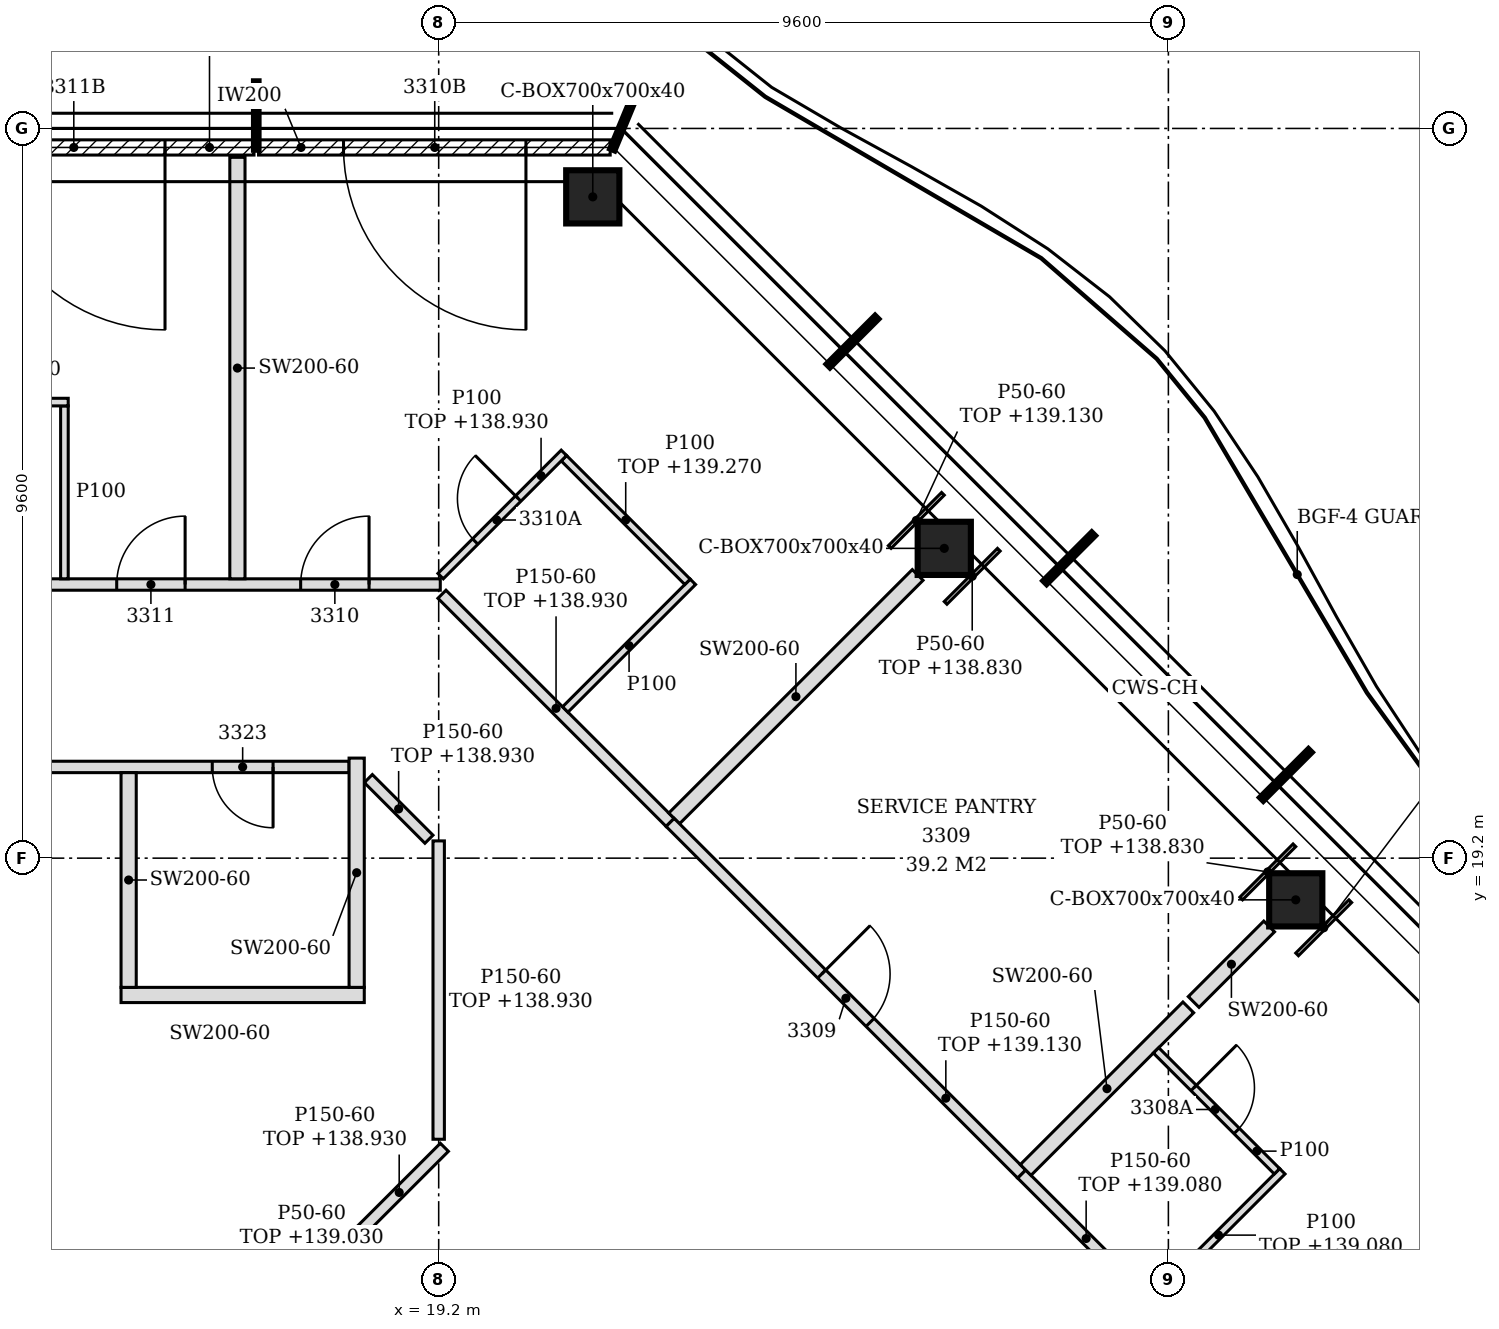
"""IFC4 building model, lengths in metres.
Left out: names, types, materials, properties, quantities, classifications, styles, units other than length and angle.
Written with IfcOpenShell. Run it as: python <this file> out.ifc"""

import sys

from ifc_helpers import new_model, si_unit, direction, frame, frame_2d, origin, origin_2d, place, context, subcontext, project, spatial, polyline, rectangle, hollow_rectangle, outline, extrude, element, fill, save


model = new_model("IFC4")
c1 = context("Model", 3, precision=1e-05, world=origin(), true_north=direction((0.0, 1.0)))
c2 = subcontext(c1, "Body", "Model", "MODEL_VIEW")
j1 = project(units=[si_unit("LENGTHUNIT", "METRE"), si_unit("PLANEANGLEUNIT", "RADIAN")], contexts=[c1])
p1 = place(None, origin())
s1 = spatial("IfcSite", under=j1, at=p1, CompositionType="ELEMENT")
p2 = place(p1, origin())
s2 = spatial("IfcBuilding", under=s1, at=p2, CompositionType="ELEMENT")
p3 = place(p2, frame((0.0, 0.0, 136.2)))
s3 = spatial("IfcBuildingStorey", under=s2, at=p3, CompositionType="ELEMENT", Elevation=136.2)
for number, where, z_axis, x_axis in (
    (1, (30.476, 18.652, -0.15), (0.0, 0.0, 1.0), (1.0, 0.0, 0.0)),
    (2, (25.852, 23.276, -0.15), (0.0, 0.0, 1.0), (1.0, 0.0, 0.0)),
    (3, (21.227, 27.9, -0.15), (0.0, 0.0, 1.0), (1.0, 0.0, 0.0)),
):
    element("IfcColumn", number, at=place(p3, frame(where, z_axis=z_axis, x_axis=x_axis)), inside=s3, PredefinedType="COLUMN", context=c2, shape_type="SweptSolid", body=[
        extrude(hollow_rectangle(XDim=0.7, YDim=0.7, WallThickness=0.04, at=origin_2d()), origin(), (0.0, 0.0, 1.0), 3.6),
    ])
p4 = place(p3, frame((21.457, 28.55, 0.0), z_axis=(0.0, 0.0, 1.0), x_axis=(-1.0, 0.0, 0.0)))
e4 = element("IfcWall", 4, at=p4, inside=s3, PredefinedType="NOTDEFINED", context=c2, shape_type="SweptSolid", body=[
    extrude(rectangle(XDim=4.626, YDim=0.2, at=frame_2d((2.313, 0.0))), origin(), (0.0, 0.0, 1.0), 3.45),
])
p5 = place(p4, frame((1.108, 0.0, 0.0)))
e5 = element("IfcOpeningElement", 5, at=p5, cuts=e4, PredefinedType="OPENING", context=c2, shape_type="SweptSolid", body=[
    extrude(rectangle(XDim=2.4, YDim=2.4, at=frame_2d((1.2, 1.2))), frame((0.0, 0.11, 0.0), z_axis=(0.0, -1.0, 0.0), x_axis=(1.0, 0.0, 0.0)), (0.0, 0.0, 1.0), 0.22),
])
p6 = place(p3, frame((16.77, 28.55, 0.0), z_axis=(0.0, 0.0, 1.0), x_axis=(-1.0, 0.0, 0.0)))
e6 = element("IfcWall", 6, at=p6, inside=s3, PredefinedType="NOTDEFINED", context=c2, shape_type="SweptSolid", body=[
    extrude(rectangle(XDim=4.74, YDim=0.2, at=frame_2d((2.37, 0.0))), origin(), (0.0, 0.0, 1.0), 3.45),
])
p7 = place(p6, frame((1.17, 0.0, 0.0)))
e7 = element("IfcOpeningElement", 7, at=p7, cuts=e6, PredefinedType="OPENING", context=c2, shape_type="SweptSolid", body=[
    extrude(rectangle(XDim=2.4, YDim=2.4, at=frame_2d((1.2, 1.2))), frame((0.0, 0.11, 0.0), z_axis=(0.0, -1.0, 0.0), x_axis=(1.0, 0.0, 0.0)), (0.0, 0.0, 1.0), 0.22),
])
p8 = place(p3, frame((28.567, 13.348, 0.0), z_axis=(0.0, 0.0, 1.0), x_axis=(-0.707310148094, 0.706903355773, 0.0)))
e8 = element("IfcWall", 8, at=p8, inside=s3, PredefinedType="PARTITIONING", context=c2, shape_type="SweptSolid", body=[
    extrude(rectangle(XDim=2.401, YDim=0.15, at=frame_2d((1.2, 0.0))), origin(), (0.0, 0.0, 1.0), 2.88),
])
p9 = place(p3, frame((18.991, 13.408, 0.0), z_axis=(0.0, 0.0, 1.0), x_axis=(-0.706998801226, 0.70721474466, 0.0)))
e9 = element("IfcWall", 9, at=p9, inside=s3, PredefinedType="PARTITIONING", context=c2, shape_type="SweptSolid", body=[
    extrude(rectangle(XDim=1.131, YDim=0.15, at=frame_2d((0.565, 0.0))), origin(), (0.0, 0.0, 1.0), 3.45),
])
p10 = place(p3, frame((28.62, 13.401, 0.0), z_axis=(0.0, 0.0, 1.0), x_axis=(0.707055379538, 0.707158179099, 0.0)))
e10 = element("IfcWall", 10, at=p10, inside=s3, PredefinedType="PARTITIONING", context=c2, shape_type="SweptSolid", body=[
    extrude(rectangle(XDim=2.375, YDim=0.1, at=frame_2d((1.188, 0.0))), origin(), (0.0, 0.0, 1.0), 2.88),
])
p11 = place(p3, frame((18.086, 14.208, 0.0), z_axis=(0.0, 0.0, 1.0), x_axis=(0.70739723372, 0.706816209298, 0.0)))
e11 = element("IfcWall", 11, at=p11, inside=s3, PredefinedType="PARTITIONING", context=c2, shape_type="SweptSolid", body=[
    extrude(rectangle(XDim=1.681, YDim=0.15, at=frame_2d((0.84, 0.0))), origin(), (0.0, 0.0, 1.0), 2.73),
])
p12 = place(p3, frame((26.869, 15.045, 0.0), z_axis=(0.0, 0.0, 1.0), x_axis=(-0.707013447311, 0.707200102744, 0.0)))
e12 = element("IfcWall", 12, at=p12, inside=s3, PredefinedType="PARTITIONING", context=c2, shape_type="SweptSolid", body=[
    extrude(rectangle(XDim=6.54, YDim=0.15, at=frame_2d((3.27, 0.0))), origin(), (0.0, 0.0, 1.0), 2.93),
])
p13 = place(p12, frame((2.82, 0.0, 0.0)))
e13 = element("IfcOpeningElement", 13, at=p13, cuts=e12, PredefinedType="OPENING", context=c2, shape_type="SweptSolid", body=[
    extrude(rectangle(XDim=0.9, YDim=2.1, at=frame_2d((0.45, 1.05))), frame((0.0, 0.085, 0.0), z_axis=(0.0, -1.0, 0.0), x_axis=(1.0, 0.0, 0.0)), (0.0, 0.0, 1.0), 0.17),
])
p14 = place(p3, frame((26.922, 15.098, 0.0), z_axis=(0.0, 0.0, 1.0), x_axis=(0.707268147401, 0.706945378138, 0.0)))
e14 = element("IfcWall", 14, at=p14, inside=s3, PredefinedType="PARTITIONING", context=c2, shape_type="SweptSolid", body=[
    extrude(rectangle(XDim=3.026, YDim=0.2, at=frame_2d((1.513, 0.0))), origin(), (0.0, 0.0, 1.0), 3.45),
])
p15 = place(p3, frame((30.229, 15.08, 0.0), z_axis=(0.0, 0.0, 1.0), x_axis=(-0.707052524, 0.70716103421, 0.0)))
e15 = element("IfcWall", 15, at=p15, inside=s3, PredefinedType="PARTITIONING", context=c2, shape_type="SweptSolid", body=[
    extrude(rectangle(XDim=2.25, YDim=0.1, at=frame_2d((1.125, 0.0))), origin(), (0.0, 0.0, 1.0), 3.45),
])
p16 = place(p15, frame((0.75, 0.0, 0.0)))
e16 = element("IfcOpeningElement", 16, at=p16, cuts=e15, PredefinedType="OPENING", context=c2, shape_type="SweptSolid", body=[
    extrude(rectangle(XDim=0.8, YDim=2.1, at=frame_2d((0.4, 1.05))), frame((0.0, 0.06, 0.0), z_axis=(0.0, -1.0, 0.0), x_axis=(1.0, 0.0, 0.0)), (0.0, 0.0, 1.0), 0.12),
])
p17 = place(p3, frame((19.2, 15.502, 0.0), z_axis=(0.0, 0.0, 1.0), x_axis=(0.0, 1.0, 0.0)))
e17 = element("IfcWall", 17, at=p17, inside=s3, PredefinedType="PARTITIONING", context=c2, shape_type="SweptSolid", body=[
    extrude(rectangle(XDim=3.925, YDim=0.15, at=frame_2d((1.962, 0.0))), origin(), (0.0, 0.0, 1.0), 2.73),
])
p18 = place(p3, frame((29.133, 17.308, 0.0), z_axis=(0.0, 0.0, 1.0), x_axis=(0.70693298083, 0.707280538835, 0.0)))
e18 = element("IfcWall", 18, at=p18, inside=s3, PredefinedType="PARTITIONING", context=c2, shape_type="SweptSolid", body=[
    extrude(rectangle(XDim=1.405, YDim=0.2, at=frame_2d((0.702, 0.0))), origin(), (0.0, 0.0, 1.0), 3.45),
])
p19 = place(p3, frame((15.021, 17.4, 0.0), z_axis=(0.0, 0.0, 1.0), x_axis=(1.0, 0.0, 0.0)))
e19 = element("IfcWall", 19, at=p19, inside=s3, PredefinedType="PARTITIONING", context=c2, shape_type="SweptSolid", body=[
    extrude(rectangle(XDim=3.2, YDim=0.2, at=frame_2d((1.6, 0.0))), origin(), (0.0, 0.0, 1.0), 3.45),
])
p20 = place(p3, frame((15.121, 17.5, 0.0), z_axis=(0.0, 0.0, 1.0), x_axis=(0.0, 1.0, 0.0)))
e20 = element("IfcWall", 20, at=p20, inside=s3, PredefinedType="PARTITIONING", context=c2, shape_type="SweptSolid", body=[
    extrude(outline(polyline([(0.0, 0.0), (2.825, 0.0), (2.825, 3.45), (1.805, 3.45), (1.803, 2.88), (1.595, 2.88), (1.593, 3.45), (0.0, 3.45), (0.0, 0.0)])), frame((0.0, 0.1, 0.0), z_axis=(0.0, -1.0, 0.0), x_axis=(1.0, 0.0, 0.0)), (0.0, 0.0, 1.0), 0.2),
])
p21 = place(p3, frame((18.121, 17.5, 0.0), z_axis=(0.0, 0.0, 1.0), x_axis=(0.0, 1.0, 0.0)))
e21 = element("IfcWall", 21, at=p21, inside=s3, PredefinedType="PARTITIONING", context=c2, shape_type="SweptSolid", body=[
    extrude(outline(polyline([(0.0, 0.0), (3.016, 0.0), (3.016, 3.45), (1.805, 3.45), (1.803, 2.88), (1.595, 2.88), (1.593, 3.45), (0.0, 3.45), (0.0, 0.0)])), frame((0.0, 0.1, 0.0), z_axis=(0.0, -1.0, 0.0), x_axis=(1.0, 0.0, 0.0)), (0.0, 0.0, 1.0), 0.2),
])
p22 = place(p3, frame((19.072, 19.449, 0.0), z_axis=(0.0, 0.0, 1.0), x_axis=(-0.707106781187, 0.707106781187, 0.0)))
e22 = element("IfcWall", 22, at=p22, inside=s3, PredefinedType="PARTITIONING", context=c2, shape_type="SweptSolid", body=[
    extrude(rectangle(XDim=1.128, YDim=0.15, at=frame_2d((0.564, 0.0))), origin(), (0.0, 0.0, 1.0), 2.73),
])
p23 = place(p3, frame((22.245, 19.67, 0.0), z_axis=(0.0, 0.0, 1.0), x_axis=(-0.707106781187, 0.707106781187, 0.0)))
e23 = element("IfcWall", 23, at=p23, inside=s3, PredefinedType="PARTITIONING", context=c2, shape_type="SweptSolid", body=[
    extrude(rectangle(XDim=4.246, YDim=0.15, at=frame_2d((2.123, 0.0))), origin(), (0.0, 0.0, 1.0), 2.73),
])
p24 = place(p3, frame((22.298, 19.723, 0.0), z_axis=(0.0, 0.0, 1.0), x_axis=(0.707160674466, 0.707052883799, 0.0)))
e24 = element("IfcWall", 24, at=p24, inside=s3, PredefinedType="PARTITIONING", context=c2, shape_type="SweptSolid", body=[
    extrude(rectangle(XDim=4.53, YDim=0.2, at=frame_2d((2.265, 0.0))), origin(), (0.0, 0.0, 1.0), 3.45),
])
p25 = place(p3, frame((7.125, 20.4, 0.0), z_axis=(0.0, 0.0, 1.0), x_axis=(1.0, 0.0, 0.0)))
e25 = element("IfcWall", 25, at=p25, inside=s3, PredefinedType="PARTITIONING", context=c2, shape_type="SweptSolid", body=[
    extrude(outline(polyline([(0.0, 0.0), (10.896, 0.0), (10.896, 3.45), (0.225, 3.45), (0.223, 2.73), (0.0, 2.73), (0.0, 0.0)])), frame((0.0, 0.075, 0.0), z_axis=(0.0, -1.0, 0.0), x_axis=(1.0, 0.0, 0.0)), (0.0, 0.0, 1.0), 0.15),
])
p26 = place(p25, frame((9.096, 0.0, 0.0)))
e26 = element("IfcOpeningElement", 26, at=p26, cuts=e25, PredefinedType="OPENING", context=c2, shape_type="SweptSolid", body=[
    extrude(rectangle(XDim=0.8, YDim=2.1, at=frame_2d((0.4, 1.05))), frame((0.0, 0.085, 0.0), z_axis=(0.0, -1.0, 0.0), x_axis=(1.0, 0.0, 0.0)), (0.0, 0.0, 1.0), 0.17),
])
p27 = place(p3, frame((20.865, 21.156, 0.0), z_axis=(0.0, 0.0, 1.0), x_axis=(0.707106781187, 0.707106781187, 0.0)))
e27 = element("IfcWall", 27, at=p27, inside=s3, PredefinedType="PARTITIONING", context=c2, shape_type="SweptSolid", body=[
    extrude(rectangle(XDim=2.375, YDim=0.1, at=frame_2d((1.188, 0.0))), origin(), (0.0, 0.0, 1.0), 3.45),
])
p28 = place(p3, frame((-4.821, 22.8, 0.0), z_axis=(0.0, 0.0, 1.0), x_axis=(1.0, 0.0, 0.0)))
e28 = element("IfcWall", 28, at=p28, inside=s3, PredefinedType="PARTITIONING", context=c2, shape_type="SweptSolid", body=[
    extrude(outline(polyline([(0.0, 0.0), (24.042, 0.0), (24.042, 2.73), (23.871, 2.73), (23.869, 3.45), (12.171, 3.45), (12.169, 2.73), (11.871, 2.73), (11.869, 3.45), (0.171, 3.45), (0.169, 2.73), (0.0, 2.73), (0.0, 0.0)])), frame((0.0, 0.075, 0.0), z_axis=(0.0, -1.0, 0.0), x_axis=(1.0, 0.0, 0.0)), (0.0, 0.0, 1.0), 0.15),
])
p29 = place(p28, frame((22.205, 0.0, 0.0)))
e29 = element("IfcOpeningElement", 29, at=p29, cuts=e28, PredefinedType="OPENING", context=c2, shape_type="SweptSolid", body=[
    extrude(rectangle(XDim=0.9, YDim=2.1, at=frame_2d((0.45, 1.05))), frame((0.0, 0.085, 0.0), z_axis=(0.0, -1.0, 0.0), x_axis=(1.0, 0.0, 0.0)), (0.0, 0.0, 1.0), 0.17),
])
p30 = place(p28, frame((19.785, 0.0, 0.0)))
e30 = element("IfcOpeningElement", 30, at=p30, cuts=e28, PredefinedType="OPENING", context=c2, shape_type="SweptSolid", body=[
    extrude(rectangle(XDim=0.9, YDim=2.1, at=frame_2d((0.45, 1.05))), frame((0.0, 0.085, 0.0), z_axis=(0.0, -1.0, 0.0), x_axis=(1.0, 0.0, 0.0)), (0.0, 0.0, 1.0), 0.17),
])
p31 = place(p28, frame((15.109, 0.0, 0.0)))
e31 = element("IfcOpeningElement", 31, at=p31, cuts=e28, PredefinedType="OPENING", context=c2, shape_type="SweptSolid", body=[
    extrude(rectangle(XDim=0.9, YDim=2.1, at=frame_2d((0.45, 1.05))), frame((0.0, 0.085, 0.0), z_axis=(0.0, -1.0, 0.0), x_axis=(1.0, 0.0, 0.0)), (0.0, 0.0, 1.0), 0.17),
])
p32 = place(p28, frame((10.433, 0.0, 0.0)))
e32 = element("IfcOpeningElement", 32, at=p32, cuts=e28, PredefinedType="OPENING", context=c2, shape_type="SweptSolid", body=[
    extrude(rectangle(XDim=0.9, YDim=2.1, at=frame_2d((0.45, 1.05))), frame((0.0, 0.085, 0.0), z_axis=(0.0, -1.0, 0.0), x_axis=(1.0, 0.0, 0.0)), (0.0, 0.0, 1.0), 0.17),
])
p33 = place(p28, frame((5.757, 0.0, 0.0)))
e33 = element("IfcOpeningElement", 33, at=p33, cuts=e28, PredefinedType="OPENING", context=c2, shape_type="SweptSolid", body=[
    extrude(rectangle(XDim=0.9, YDim=2.1, at=frame_2d((0.45, 1.05))), frame((0.0, 0.085, 0.0), z_axis=(0.0, -1.0, 0.0), x_axis=(1.0, 0.0, 0.0)), (0.0, 0.0, 1.0), 0.17),
])
p34 = place(p28, frame((0.938, 0.0, 0.0)))
e34 = element("IfcOpeningElement", 34, at=p34, cuts=e28, PredefinedType="OPENING", context=c2, shape_type="SweptSolid", body=[
    extrude(rectangle(XDim=0.9, YDim=2.1, at=frame_2d((0.45, 1.05))), frame((0.0, 0.085, 0.0), z_axis=(0.0, -1.0, 0.0), x_axis=(1.0, 0.0, 0.0)), (0.0, 0.0, 1.0), 0.17),
])
p35 = place(p3, frame((22.474, 22.835, 0.0), z_axis=(0.0, 0.0, 1.0), x_axis=(-0.707106781187, 0.707106781187, 0.0)))
e35 = element("IfcWall", 35, at=p35, inside=s3, PredefinedType="PARTITIONING", context=c2, shape_type="SweptSolid", body=[
    extrude(rectangle(XDim=2.3, YDim=0.1, at=frame_2d((1.15, 0.0))), origin(), (0.0, 0.0, 1.0), 3.07),
])
p36 = place(p3, frame((14.276, 22.875, 0.0), z_axis=(0.0, 0.0, 1.0), x_axis=(0.0, 1.0, 0.0)))
e36 = element("IfcWall", 36, at=p36, inside=s3, PredefinedType="PARTITIONING", context=c2, shape_type="SweptSolid", body=[
    extrude(outline(polyline([(0.0, 0.0), (2.275, 0.0), (2.275, 3.45), (1.23, 3.45), (1.228, 2.88), (1.02, 2.88), (1.018, 3.45), (0.0, 3.45), (0.0, 0.0)])), frame((0.0, 0.05, 0.0), z_axis=(0.0, -1.0, 0.0), x_axis=(1.0, 0.0, 0.0)), (0.0, 0.0, 1.0), 0.1),
])
p37 = place(p3, frame((16.552, 22.875, 0.0), z_axis=(0.0, 0.0, 1.0), x_axis=(0.0, 1.0, 0.0)))
e37 = element("IfcWall", 37, at=p37, inside=s3, PredefinedType="PARTITIONING", context=c2, shape_type="SweptSolid", body=[
    extrude(outline(polyline([(0.0, 0.0), (5.545, 0.0), (5.545, 3.45), (5.175, 3.45), (5.173, 2.93), (4.875, 2.93), (4.873, 3.45), (1.23, 3.45), (1.228, 2.88), (1.02, 2.88), (1.018, 3.45), (0.0, 3.45), (0.0, 0.0)])), frame((0.0, 0.1, 0.0), z_axis=(0.0, -1.0, 0.0), x_axis=(1.0, 0.0, 0.0)), (0.0, 0.0, 1.0), 0.2),
])
p38 = place(p3, frame((19.225, 22.91, 0.0), z_axis=(0.0, 0.0, 1.0), x_axis=(0.707106781187, 0.707106781187, 0.0)))
e38 = element("IfcWall", 38, at=p38, inside=s3, PredefinedType="PARTITIONING", context=c2, shape_type="SweptSolid", body=[
    extrude(rectangle(XDim=2.294, YDim=0.1, at=frame_2d((1.147, 0.0))), origin(), (0.0, 0.0, 1.0), 2.73),
])
p39 = place(p38, frame((0.644, 0.0, 0.0)))
e39 = element("IfcOpeningElement", 39, at=p39, cuts=e38, PredefinedType="OPENING", context=c2, shape_type="SweptSolid", body=[
    extrude(rectangle(XDim=0.8, YDim=2.1, at=frame_2d((0.4, 1.05))), frame((0.0, 0.06, 0.0), z_axis=(0.0, -1.0, 0.0), x_axis=(1.0, 0.0, 0.0)), (0.0, 0.0, 1.0), 0.12),
])
p40 = place(p3, frame((11.976, 25.2, 0.0), z_axis=(0.0, 0.0, 1.0), x_axis=(1.0, 0.0, 0.0)))
e40 = element("IfcWall", 40, at=p40, inside=s3, PredefinedType="PARTITIONING", context=c2, shape_type="SweptSolid", body=[
    extrude(rectangle(XDim=2.35, YDim=0.1, at=frame_2d((1.175, 0.0))), origin(), (0.0, 0.0, 1.0), 3.45),
])
p41 = place(p40, frame((0.7, 0.0, 0.0)))
e41 = element("IfcOpeningElement", 41, at=p41, cuts=e40, PredefinedType="OPENING", context=c2, shape_type="SweptSolid", body=[
    extrude(rectangle(XDim=0.8, YDim=2.1, at=frame_2d((0.4, 1.05))), frame((0.0, 0.06, 0.0), z_axis=(0.0, -1.0, 0.0), x_axis=(1.0, 0.0, 0.0)), (0.0, 0.0, 1.0), 0.12),
])
p42 = place(p3, frame((29.758, 18.669, 0.0), z_axis=(0.0, 0.0, 1.0), x_axis=(0.706983473703, 0.707230067171, 0.0)))
e42 = element("IfcWall", 42, at=p42, inside=s3, PredefinedType="PARTITIONING", context=c2, shape_type="SweptSolid", body=[
    extrude(rectangle(XDim=0.99, YDim=0.05, at=frame_2d((0.495, 0.0))), origin(), (0.0, 0.0, 1.0), 2.63),
])
for number, where, z_axis, x_axis in (
    (43, (30.493, 17.934, 0.0), (0.0, 0.0, 1.0), (0.707, 0.707, 0.0)),
    (44, (25.134, 23.293, 0.0), (0.0, 0.0, 1.0), (0.707, 0.707, 0.0)),
):
    element("IfcWall", number, at=place(p3, frame(where, z_axis=z_axis, x_axis=x_axis)), inside=s3, PredefinedType="PARTITIONING", context=c2, shape_type="SweptSolid", body=[
        extrude(rectangle(XDim=0.99, YDim=0.05, at=frame_2d((0.495, 0.0))), origin(), (0.0, 0.0, 1.0), 2.93),
    ])
p43 = place(p3, frame((25.869, 22.558, 0.0), z_axis=(0.0, 0.0, 1.0), x_axis=(0.707230110177, 0.706983430682, 0.0)))
e45 = element("IfcWall", 45, at=p43, inside=s3, PredefinedType="PARTITIONING", context=c2, shape_type="SweptSolid", body=[
    extrude(rectangle(XDim=0.99, YDim=0.05, at=frame_2d((0.495, 0.0))), origin(), (0.0, 0.0, 1.0), 2.63),
])
p44 = place(p5, origin())
e46 = element("IfcDoor", 46, at=p44, inside=s3, OperationType="SINGLE_SWING_LEFT", PredefinedType="DOOR", context=c2, shape_type="SweptSolid", body=[
    extrude(rectangle(XDim=2.4, YDim=2.4, at=frame_2d((1.2, 1.2))), frame((0.0, 0.025, 0.0), z_axis=(0.0, -1.0, 0.0), x_axis=(1.0, 0.0, 0.0)), (0.0, 0.0, 1.0), 0.05),
])
fill(e5, e46)
p45 = place(p7, origin())
e47 = element("IfcDoor", 47, at=p45, inside=s3, OperationType="SINGLE_SWING_LEFT", PredefinedType="DOOR", context=c2, shape_type="SweptSolid", body=[
    extrude(rectangle(XDim=2.4, YDim=2.4, at=frame_2d((1.2, 1.2))), frame((0.0, 0.025, 0.0), z_axis=(0.0, -1.0, 0.0), x_axis=(1.0, 0.0, 0.0)), (0.0, 0.0, 1.0), 0.05),
])
fill(e7, e47)
p46 = place(p16, frame((0.8, 0.0, 0.0), z_axis=(0.0, 0.0, 1.0), x_axis=(-1.0, 0.0, 0.0)))
e48 = element("IfcDoor", 48, at=p46, inside=s3, OperationType="SINGLE_SWING_LEFT", PredefinedType="DOOR", context=c2, shape_type="SweptSolid", body=[
    extrude(rectangle(XDim=0.8, YDim=2.1, at=frame_2d((0.4, 1.05))), frame((0.0, 0.025, 0.0), z_axis=(0.0, -1.0, 0.0), x_axis=(1.0, 0.0, 0.0)), (0.0, 0.0, 1.0), 0.05),
])
fill(e16, e48)
p47 = place(p13, frame((0.9, 0.0, 0.0), z_axis=(0.0, 0.0, 1.0), x_axis=(-1.0, 0.0, 0.0)))
e49 = element("IfcDoor", 49, at=p47, inside=s3, OperationType="SINGLE_SWING_LEFT", PredefinedType="DOOR", context=c2, shape_type="SweptSolid", body=[
    extrude(rectangle(XDim=0.9, YDim=2.1, at=frame_2d((0.45, 1.05))), frame((0.0, 0.025, 0.0), z_axis=(0.0, -1.0, 0.0), x_axis=(1.0, 0.0, 0.0)), (0.0, 0.0, 1.0), 0.05),
])
fill(e13, e49)
p48 = place(p29, origin())
e50 = element("IfcDoor", 50, at=p48, inside=s3, OperationType="SINGLE_SWING_RIGHT", PredefinedType="DOOR", context=c2, shape_type="SweptSolid", body=[
    extrude(rectangle(XDim=0.9, YDim=2.1, at=frame_2d((0.45, 1.05))), frame((0.0, 0.025, 0.0), z_axis=(0.0, -1.0, 0.0), x_axis=(1.0, 0.0, 0.0)), (0.0, 0.0, 1.0), 0.05),
])
fill(e29, e50)
p49 = place(p39, origin())
e51 = element("IfcDoor", 51, at=p49, inside=s3, OperationType="SINGLE_SWING_RIGHT", PredefinedType="DOOR", context=c2, shape_type="SweptSolid", body=[
    extrude(rectangle(XDim=0.8, YDim=2.1, at=frame_2d((0.4, 1.05))), frame((0.0, 0.025, 0.0), z_axis=(0.0, -1.0, 0.0), x_axis=(1.0, 0.0, 0.0)), (0.0, 0.0, 1.0), 0.05),
])
fill(e39, e51)
p50 = place(p30, origin())
e52 = element("IfcDoor", 52, at=p50, inside=s3, OperationType="SINGLE_SWING_RIGHT", PredefinedType="DOOR", context=c2, shape_type="SweptSolid", body=[
    extrude(rectangle(XDim=0.9, YDim=2.1, at=frame_2d((0.45, 1.05))), frame((0.0, 0.025, 0.0), z_axis=(0.0, -1.0, 0.0), x_axis=(1.0, 0.0, 0.0)), (0.0, 0.0, 1.0), 0.05),
])
fill(e30, e52)
p51 = place(p26, frame((0.8, 0.0, 0.0), z_axis=(0.0, 0.0, 1.0), x_axis=(-1.0, 0.0, 0.0)))
e53 = element("IfcDoor", 53, at=p51, inside=s3, OperationType="SINGLE_SWING_LEFT", PredefinedType="DOOR", context=c2, shape_type="SweptSolid", body=[
    extrude(rectangle(XDim=0.8, YDim=2.1, at=frame_2d((0.4, 1.05))), frame((0.0, 0.025, 0.0), z_axis=(0.0, -1.0, 0.0), x_axis=(1.0, 0.0, 0.0)), (0.0, 0.0, 1.0), 0.05),
])
fill(e26, e53)
save(model, sys.argv[1])
